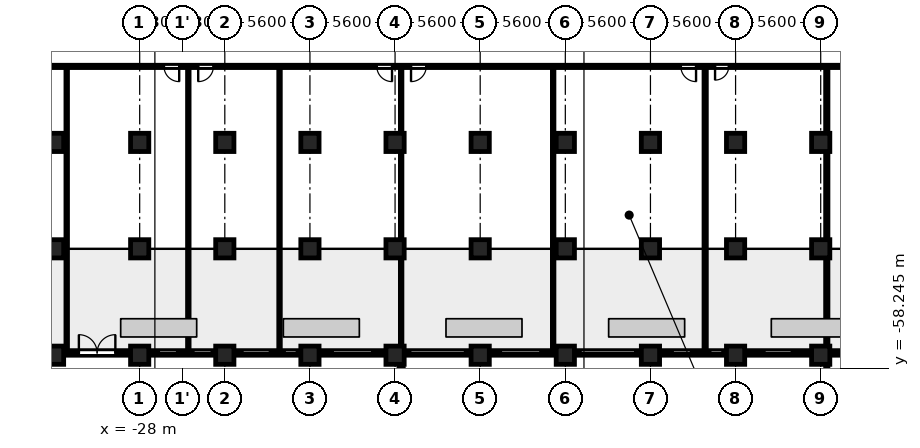
"""IFC4 building model, lengths in metres.
Left out: names, types, materials, properties, quantities, classifications, styles, units other than length and angle.
Written with IfcOpenShell. Run it as: python <this file> out.ifc"""

import sys

from ifc_helpers import new_model, si_unit, direction, frame, frame_2d, origin, origin_2d, place, context, subcontext, project, spatial, rectangle, circle, extrude, element, fill, save


model = new_model("IFC4")
c1 = context("Model", 3, precision=1e-05, world=origin(), true_north=direction((0.0, 1.0)))
c2 = subcontext(c1, "Body", "Model", "MODEL_VIEW")
j1 = project(units=[si_unit("LENGTHUNIT", "METRE"), si_unit("PLANEANGLEUNIT", "RADIAN")], contexts=[c1])
p1 = place(None, origin())
s1 = spatial("IfcSite", under=j1, at=p1, CompositionType="ELEMENT")
p2 = place(p1, origin())
s2 = spatial("IfcBuilding", under=s1, at=p2, CompositionType="ELEMENT")
p3 = place(p2, frame((0.0, 0.0, 6.5)))
s3 = spatial("IfcBuildingStorey", under=s2, at=p3, CompositionType="ELEMENT", Elevation=6.5)
for number, where, z_axis, x_axis in (
    (1, (-33.6, -43.4, 0.0), (0.0, 0.0, 1.0), (1.0, 0.0, 0.0)),
    (2, (-28.0, -43.4, 0.0), (0.0, 0.0, 1.0), (1.0, 0.0, 0.0)),
    (3, (-22.4, -43.4, 0.0), (0.0, 0.0, 1.0), (1.0, 0.0, 0.0)),
    (4, (-16.8, -43.4, 0.0), (0.0, 0.0, 1.0), (1.0, 0.0, 0.0)),
    (5, (-11.2, -43.4, 0.0), (0.0, 0.0, 1.0), (1.0, 0.0, 0.0)),
    (6, (-5.6, -43.4, 0.0), (0.0, 0.0, 1.0), (1.0, 0.0, 0.0)),
    (7, (0.0, -43.4, 0.0), (0.0, 0.0, 1.0), (1.0, 0.0, 0.0)),
    (8, (5.6, -43.4, 0.0), (0.0, 0.0, 1.0), (1.0, 0.0, 0.0)),
    (9, (11.2, -43.4, 0.0), (0.0, 0.0, 1.0), (1.0, 0.0, 0.0)),
    (10, (16.8, -43.4, 0.0), (0.0, 0.0, 1.0), (1.0, 0.0, 0.0)),
    (11, (-33.6, -50.4, 0.0), (0.0, 0.0, 1.0), (1.0, 0.0, 0.0)),
    (12, (-28.0, -50.4, 0.0), (0.0, 0.0, 1.0), (1.0, 0.0, 0.0)),
    (13, (-22.4, -50.4, 0.0), (0.0, 0.0, 1.0), (1.0, 0.0, 0.0)),
    (14, (-16.8, -50.4, 0.0), (0.0, 0.0, 1.0), (1.0, 0.0, 0.0)),
    (15, (-11.2, -50.4, 0.0), (0.0, 0.0, 1.0), (1.0, 0.0, 0.0)),
    (16, (-5.6, -50.4, 0.0), (0.0, 0.0, 1.0), (1.0, 0.0, 0.0)),
    (17, (0.0, -50.4, 0.0), (0.0, 0.0, 1.0), (1.0, 0.0, 0.0)),
    (18, (5.6, -50.4, 0.0), (0.0, 0.0, 1.0), (1.0, 0.0, 0.0)),
    (19, (11.2, -50.4, 0.0), (0.0, 0.0, 1.0), (1.0, 0.0, 0.0)),
    (20, (16.8, -50.4, 0.0), (0.0, 0.0, 1.0), (1.0, 0.0, 0.0)),
    (21, (-33.6, -57.4, 0.0), (0.0, 0.0, 1.0), (1.0, 0.0, 0.0)),
    (22, (-28.0, -57.4, 0.0), (0.0, 0.0, 1.0), (1.0, 0.0, 0.0)),
    (23, (-22.4, -57.4, 0.0), (0.0, 0.0, 1.0), (1.0, 0.0, 0.0)),
    (24, (-16.8, -57.4, 0.0), (0.0, 0.0, 1.0), (1.0, 0.0, 0.0)),
    (25, (-11.2, -57.4, 0.0), (0.0, 0.0, 1.0), (1.0, 0.0, 0.0)),
    (26, (-5.6, -57.4, 0.0), (0.0, 0.0, 1.0), (1.0, 0.0, 0.0)),
    (27, (0.0, -57.4, 0.0), (0.0, 0.0, 1.0), (1.0, 0.0, 0.0)),
    (28, (5.6, -57.4, 0.0), (0.0, 0.0, 1.0), (1.0, 0.0, 0.0)),
    (29, (11.2, -57.4, 0.0), (0.0, 0.0, 1.0), (1.0, 0.0, 0.0)),
    (30, (16.8, -57.4, 0.0), (0.0, 0.0, 1.0), (1.0, 0.0, 0.0)),
):
    element("IfcColumn", number, at=place(p3, frame(where, z_axis=z_axis, x_axis=x_axis)), inside=s3, PredefinedType="COLUMN", context=c2, shape_type="SweptSolid", body=[
        extrude(circle(Radius=0.6, at=origin_2d()), origin(), (0.0, 0.0, 1.0), 4.8),
    ])
p4 = place(p3, frame((-33.0, -57.25, 0.0), z_axis=(0.0, 0.0, 1.0), x_axis=(1.0, 0.0, 0.0)))
e31 = element("IfcWall", 31, at=p4, inside=s3, PredefinedType="SOLIDWALL", context=c2, shape_type="SweptSolid", body=[
    extrude(rectangle(XDim=4.4, YDim=0.3, at=frame_2d((2.2, 0.0))), origin(), (0.0, 0.0, 1.0), 3.65),
])
p5 = place(p4, frame((1.0, 0.0, 0.0)))
e32 = element("IfcOpeningElement", 32, at=p5, cuts=e31, PredefinedType="OPENING", context=c2, shape_type="SweptSolid", body=[
    extrude(rectangle(XDim=2.4, YDim=2.3, at=frame_2d((1.2, 1.15))), frame((0.0, 0.16, 0.0), z_axis=(0.0, -1.0, 0.0), x_axis=(1.0, 0.0, 0.0)), (0.0, 0.0, 1.0), 0.32),
])
p6 = place(p3, frame((-27.4, -57.25, 0.0), z_axis=(0.0, 0.0, 1.0), x_axis=(1.0, 0.0, 0.0)))
e33 = element("IfcWall", 33, at=p6, inside=s3, PredefinedType="SOLIDWALL", context=c2, shape_type="SweptSolid", body=[
    extrude(rectangle(XDim=4.4, YDim=0.3, at=frame_2d((2.2, 0.0))), origin(), (0.0, 0.0, 1.0), 3.65),
])
p7 = place(p6, frame((0.663, 0.0, 0.6)))
e34 = element("IfcOpeningElement", 34, at=p7, cuts=e33, PredefinedType="OPENING", context=c2, shape_type="SweptSolid", body=[
    extrude(rectangle(XDim=1.2, YDim=1.55, at=frame_2d((0.6, 0.775))), frame((0.0, 0.16, 0.0), z_axis=(0.0, -1.0, 0.0), x_axis=(1.0, 0.0, 0.0)), (0.0, 0.0, 1.0), 0.32),
])
p8 = place(p6, frame((2.938, 0.0, 0.6)))
e35 = element("IfcOpeningElement", 35, at=p8, cuts=e33, PredefinedType="OPENING", context=c2, shape_type="SweptSolid", body=[
    extrude(rectangle(XDim=1.2, YDim=1.55, at=frame_2d((0.6, 0.775))), frame((0.0, 0.16, 0.0), z_axis=(0.0, -1.0, 0.0), x_axis=(1.0, 0.0, 0.0)), (0.0, 0.0, 1.0), 0.32),
])
p9 = place(p3, frame((-21.8, -57.25, 0.0), z_axis=(0.0, 0.0, 1.0), x_axis=(1.0, 0.0, 0.0)))
e36 = element("IfcWall", 36, at=p9, inside=s3, PredefinedType="SOLIDWALL", context=c2, shape_type="SweptSolid", body=[
    extrude(rectangle(XDim=4.4, YDim=0.3, at=frame_2d((2.2, 0.0))), origin(), (0.0, 0.0, 1.0), 3.65),
])
p10 = place(p9, frame((0.562, 0.0, 0.9)))
e37 = element("IfcOpeningElement", 37, at=p10, cuts=e36, PredefinedType="OPENING", context=c2, shape_type="SweptSolid", body=[
    extrude(rectangle(XDim=1.8, YDim=1.25, at=frame_2d((0.9, 0.625))), frame((0.0, 0.16, 0.0), z_axis=(0.0, -1.0, 0.0), x_axis=(1.0, 0.0, 0.0)), (0.0, 0.0, 1.0), 0.32),
])
p11 = place(p9, frame((3.337, 0.0, 0.6)))
e38 = element("IfcOpeningElement", 38, at=p11, cuts=e36, PredefinedType="OPENING", context=c2, shape_type="SweptSolid", body=[
    extrude(rectangle(XDim=0.8, YDim=1.55, at=frame_2d((0.4, 0.775))), frame((0.0, 0.16, 0.0), z_axis=(0.0, -1.0, 0.0), x_axis=(1.0, 0.0, 0.0)), (0.0, 0.0, 1.0), 0.32),
])
p12 = place(p3, frame((-16.2, -57.25, 0.0), z_axis=(0.0, 0.0, 1.0), x_axis=(1.0, 0.0, 0.0)))
e39 = element("IfcWall", 39, at=p12, inside=s3, PredefinedType="SOLIDWALL", context=c2, shape_type="SweptSolid", body=[
    extrude(rectangle(XDim=4.4, YDim=0.3, at=frame_2d((2.2, 0.0))), origin(), (0.0, 0.0, 1.0), 3.65),
])
p13 = place(p12, frame((0.9, 0.0, 0.9)))
e40 = element("IfcOpeningElement", 40, at=p13, cuts=e39, PredefinedType="OPENING", context=c2, shape_type="SweptSolid", body=[
    extrude(rectangle(XDim=2.6, YDim=1.25, at=frame_2d((1.3, 0.625))), frame((0.0, 0.16, 0.0), z_axis=(0.0, -1.0, 0.0), x_axis=(1.0, 0.0, 0.0)), (0.0, 0.0, 1.0), 0.32),
])
p14 = place(p3, frame((-10.6, -57.25, 0.0), z_axis=(0.0, 0.0, 1.0), x_axis=(1.0, 0.0, 0.0)))
e41 = element("IfcWall", 41, at=p14, inside=s3, PredefinedType="SOLIDWALL", context=c2, shape_type="SweptSolid", body=[
    extrude(rectangle(XDim=4.4, YDim=0.3, at=frame_2d((2.2, 0.0))), origin(), (0.0, 0.0, 1.0), 3.65),
])
p15 = place(p14, frame((0.4, 0.0, 1.2)))
e42 = element("IfcOpeningElement", 42, at=p15, cuts=e41, PredefinedType="OPENING", context=c2, shape_type="SweptSolid", body=[
    extrude(rectangle(XDim=3.6, YDim=0.95, at=frame_2d((1.8, 0.475))), frame((0.0, 0.16, 0.0), z_axis=(0.0, -1.0, 0.0), x_axis=(1.0, 0.0, 0.0)), (0.0, 0.0, 1.0), 0.32),
])
p16 = place(p3, frame((-5.0, -57.25, 0.0), z_axis=(0.0, 0.0, 1.0), x_axis=(1.0, 0.0, 0.0)))
e43 = element("IfcWall", 43, at=p16, inside=s3, PredefinedType="SOLIDWALL", context=c2, shape_type="SweptSolid", body=[
    extrude(rectangle(XDim=4.4, YDim=0.3, at=frame_2d((2.2, 0.0))), origin(), (0.0, 0.0, 1.0), 3.65),
])
p17 = place(p16, frame((0.762, 0.0, 0.9)))
e44 = element("IfcOpeningElement", 44, at=p17, cuts=e43, PredefinedType="OPENING", context=c2, shape_type="SweptSolid", body=[
    extrude(rectangle(XDim=2.6, YDim=1.25, at=frame_2d((1.3, 0.625))), frame((0.0, 0.16, 0.0), z_axis=(0.0, -1.0, 0.0), x_axis=(1.0, 0.0, 0.0)), (0.0, 0.0, 1.0), 0.32),
])
p18 = place(p3, frame((0.6, -57.25, 0.0), z_axis=(0.0, 0.0, 1.0), x_axis=(1.0, 0.0, 0.0)))
e45 = element("IfcWall", 45, at=p18, inside=s3, PredefinedType="SOLIDWALL", context=c2, shape_type="SweptSolid", body=[
    extrude(rectangle(XDim=4.4, YDim=0.3, at=frame_2d((2.2, 0.0))), origin(), (0.0, 0.0, 1.0), 3.65),
])
p19 = place(p18, frame((0.4, 0.0, 1.2)))
e46 = element("IfcOpeningElement", 46, at=p19, cuts=e45, PredefinedType="OPENING", context=c2, shape_type="SweptSolid", body=[
    extrude(rectangle(XDim=3.6, YDim=0.95, at=frame_2d((1.8, 0.475))), frame((0.0, 0.16, 0.0), z_axis=(0.0, -1.0, 0.0), x_axis=(1.0, 0.0, 0.0)), (0.0, 0.0, 1.0), 0.32),
])
p20 = place(p3, frame((6.2, -57.25, 0.0), z_axis=(0.0, 0.0, 1.0), x_axis=(1.0, 0.0, 0.0)))
e47 = element("IfcWall", 47, at=p20, inside=s3, PredefinedType="SOLIDWALL", context=c2, shape_type="SweptSolid", body=[
    extrude(rectangle(XDim=4.4, YDim=0.3, at=frame_2d((2.2, 0.0))), origin(), (0.0, 0.0, 1.0), 3.65),
])
p21 = place(p20, frame((0.863, 0.0, 0.6)))
e48 = element("IfcOpeningElement", 48, at=p21, cuts=e47, PredefinedType="OPENING", context=c2, shape_type="SweptSolid", body=[
    extrude(rectangle(XDim=1.2, YDim=1.55, at=frame_2d((0.6, 0.775))), frame((0.0, 0.16, 0.0), z_axis=(0.0, -1.0, 0.0), x_axis=(1.0, 0.0, 0.0)), (0.0, 0.0, 1.0), 0.32),
])
p22 = place(p20, frame((3.337, 0.0, 0.6)))
e49 = element("IfcOpeningElement", 49, at=p22, cuts=e47, PredefinedType="OPENING", context=c2, shape_type="SweptSolid", body=[
    extrude(rectangle(XDim=0.8, YDim=1.55, at=frame_2d((0.4, 0.775))), frame((0.0, 0.16, 0.0), z_axis=(0.0, -1.0, 0.0), x_axis=(1.0, 0.0, 0.0)), (0.0, 0.0, 1.0), 0.32),
])
p23 = place(p3, frame((11.8, -57.25, 0.0), z_axis=(0.0, 0.0, 1.0), x_axis=(1.0, 0.0, 0.0)))
e50 = element("IfcWall", 50, at=p23, inside=s3, PredefinedType="SOLIDWALL", context=c2, shape_type="SweptSolid", body=[
    extrude(rectangle(XDim=4.4, YDim=0.3, at=frame_2d((2.2, 0.0))), origin(), (0.0, 0.0, 1.0), 3.65),
])
p24 = place(p23, frame((1.3, 0.0, 0.9)))
e51 = element("IfcOpeningElement", 51, at=p24, cuts=e50, PredefinedType="OPENING", context=c2, shape_type="SweptSolid", body=[
    extrude(rectangle(XDim=1.8, YDim=1.25, at=frame_2d((0.9, 0.625))), frame((0.0, 0.16, 0.0), z_axis=(0.0, -1.0, 0.0), x_axis=(1.0, 0.0, 0.0)), (0.0, 0.0, 1.0), 0.32),
])
p25 = place(p3, frame((17.4, -57.25, 0.0), z_axis=(0.0, 0.0, 1.0), x_axis=(1.0, 0.0, 0.0)))
e52 = element("IfcWall", 52, at=p25, inside=s3, PredefinedType="SOLIDWALL", context=c2, shape_type="SweptSolid", body=[
    extrude(rectangle(XDim=4.4, YDim=0.3, at=frame_2d((2.2, 0.0))), origin(), (0.0, 0.0, 1.0), 3.65),
])
p26 = place(p3, frame((-44.48, -38.4, 0.0), z_axis=(0.0, 0.0, 1.0), x_axis=(1.0, 0.0, 0.0)))
e53 = element("IfcWall", 53, at=p26, inside=s3, PredefinedType="PARTITIONING", context=c2, shape_type="SweptSolid", body=[
    extrude(rectangle(XDim=88.96, YDim=0.15, at=frame_2d((44.48, 0.0))), origin(), (0.0, 0.0, 1.0), 4.45),
])
p27 = place(p26, frame((0.42, 0.0, 0.0)))
e54 = element("IfcOpeningElement", 54, at=p27, cuts=e53, PredefinedType="OPENING", context=c2, shape_type="SweptSolid", body=[
    extrude(rectangle(XDim=1.0, YDim=2.1, at=frame_2d((0.5, 1.05))), frame((0.0, 0.085, 0.0), z_axis=(0.0, -1.0, 0.0), x_axis=(1.0, 0.0, 0.0)), (0.0, 0.0, 1.0), 0.17),
])
p28 = place(p26, frame((18.08, 0.0, 0.0)))
e55 = element("IfcOpeningElement", 55, at=p28, cuts=e53, PredefinedType="OPENING", context=c2, shape_type="SweptSolid", body=[
    extrude(rectangle(XDim=1.0, YDim=2.1, at=frame_2d((0.5, 1.05))), frame((0.0, 0.085, 0.0), z_axis=(0.0, -1.0, 0.0), x_axis=(1.0, 0.0, 0.0)), (0.0, 0.0, 1.0), 0.17),
])
p29 = place(p26, frame((20.33, 0.0, 0.0)))
e56 = element("IfcOpeningElement", 56, at=p29, cuts=e53, PredefinedType="OPENING", context=c2, shape_type="SweptSolid", body=[
    extrude(rectangle(XDim=1.0, YDim=2.1, at=frame_2d((0.5, 1.05))), frame((0.0, 0.085, 0.0), z_axis=(0.0, -1.0, 0.0), x_axis=(1.0, 0.0, 0.0)), (0.0, 0.0, 1.0), 0.17),
])
p30 = place(p26, frame((32.08, 0.0, 0.0)))
e57 = element("IfcOpeningElement", 57, at=p30, cuts=e53, PredefinedType="OPENING", context=c2, shape_type="SweptSolid", body=[
    extrude(rectangle(XDim=1.0, YDim=2.1, at=frame_2d((0.5, 1.05))), frame((0.0, 0.085, 0.0), z_axis=(0.0, -1.0, 0.0), x_axis=(1.0, 0.0, 0.0)), (0.0, 0.0, 1.0), 0.17),
])
p31 = place(p26, frame((34.33, 0.0, 0.0)))
e58 = element("IfcOpeningElement", 58, at=p31, cuts=e53, PredefinedType="OPENING", context=c2, shape_type="SweptSolid", body=[
    extrude(rectangle(XDim=1.0, YDim=2.1, at=frame_2d((0.5, 1.05))), frame((0.0, 0.085, 0.0), z_axis=(0.0, -1.0, 0.0), x_axis=(1.0, 0.0, 0.0)), (0.0, 0.0, 1.0), 0.17),
])
p32 = place(p26, frame((52.08, 0.0, 0.0)))
e59 = element("IfcOpeningElement", 59, at=p32, cuts=e53, PredefinedType="OPENING", context=c2, shape_type="SweptSolid", body=[
    extrude(rectangle(XDim=1.0, YDim=2.1, at=frame_2d((0.5, 1.05))), frame((0.0, 0.085, 0.0), z_axis=(0.0, -1.0, 0.0), x_axis=(1.0, 0.0, 0.0)), (0.0, 0.0, 1.0), 0.17),
])
p33 = place(p26, frame((54.33, 0.0, 0.0)))
e60 = element("IfcOpeningElement", 60, at=p33, cuts=e53, PredefinedType="OPENING", context=c2, shape_type="SweptSolid", body=[
    extrude(rectangle(XDim=0.9, YDim=2.1, at=frame_2d((0.45, 1.05))), frame((0.0, 0.085, 0.0), z_axis=(0.0, -1.0, 0.0), x_axis=(1.0, 0.0, 0.0)), (0.0, 0.0, 1.0), 0.17),
])
p34 = place(p26, frame((87.58, 0.0, 0.0)))
e61 = element("IfcOpeningElement", 61, at=p34, cuts=e53, PredefinedType="OPENING", context=c2, shape_type="SweptSolid", body=[
    extrude(rectangle(XDim=1.0, YDim=2.1, at=frame_2d((0.5, 1.05))), frame((0.0, 0.085, 0.0), z_axis=(0.0, -1.0, 0.0), x_axis=(1.0, 0.0, 0.0)), (0.0, 0.0, 1.0), 0.17),
])
for number, where, z_axis, x_axis in (
    (62, (-32.8, -57.08, 0.0), (0.0, 0.0, 1.0), (0.0, 1.0, 0.0)),
    (63, (-24.8, -57.08, 0.0), (0.0, 0.0, 1.0), (0.0, 1.0, 0.0)),
    (64, (-18.8, -57.08, 0.0), (0.0, 0.0, 1.0), (0.0, 1.0, 0.0)),
):
    element("IfcWall", number, at=place(p3, frame(where, z_axis=z_axis, x_axis=x_axis)), inside=s3, PredefinedType="PARTITIONING", context=c2, shape_type="SweptSolid", body=[
        extrude(rectangle(XDim=18.605, YDim=0.1, at=frame_2d((9.302, 0.0))), origin(), (0.0, 0.0, 1.0), 4.45),
    ])
p35 = place(p3, frame((-10.8, -58.23, 0.0), z_axis=(0.0, 0.0, 1.0), x_axis=(0.0, 1.0, 0.0)))
e65 = element("IfcWall", 65, at=p35, inside=s3, PredefinedType="PARTITIONING", context=c2, shape_type="SweptSolid", body=[
    extrude(rectangle(XDim=19.755, YDim=0.1, at=frame_2d((9.877, 0.0))), origin(), (0.0, 0.0, 1.0), 4.45),
])
p36 = place(p3, frame((-0.8, -57.08, 0.0), z_axis=(0.0, 0.0, 1.0), x_axis=(0.0, 1.0, 0.0)))
e66 = element("IfcWall", 66, at=p36, inside=s3, PredefinedType="PARTITIONING", context=c2, shape_type="SweptSolid", body=[
    extrude(rectangle(XDim=18.605, YDim=0.1, at=frame_2d((9.302, 0.0))), origin(), (0.0, 0.0, 1.0), 4.45),
])
p37 = place(p3, frame((9.2, -57.08, 0.0), z_axis=(0.0, 0.0, 1.0), x_axis=(0.0, 1.0, 0.0)))
e67 = element("IfcWall", 67, at=p37, inside=s3, PredefinedType="PARTITIONING", context=c2, shape_type="SweptSolid", body=[
    extrude(rectangle(XDim=18.605, YDim=0.15, at=frame_2d((9.302, 0.0))), origin(), (0.0, 0.0, 1.0), 4.45),
])
p38 = place(p3, frame((17.2, -58.23, 0.0), z_axis=(0.0, 0.0, 1.0), x_axis=(0.0, 1.0, 0.0)))
e68 = element("IfcWall", 68, at=p38, inside=s3, PredefinedType="PARTITIONING", context=c2, shape_type="SweptSolid", body=[
    extrude(rectangle(XDim=19.755, YDim=0.15, at=frame_2d((9.877, 0.0))), origin(), (0.0, 0.0, 1.0), 4.45),
])
p39 = place(p5, origin())
e69 = element("IfcDoor", 69, at=p39, inside=s3, OperationType="SINGLE_SWING_LEFT", PredefinedType="DOOR", context=c2, shape_type="SweptSolid", body=[
    extrude(rectangle(XDim=2.4, YDim=2.3, at=frame_2d((1.2, 1.15))), frame((0.0, 0.025, 0.0), z_axis=(0.0, -1.0, 0.0), x_axis=(1.0, 0.0, 0.0)), (0.0, 0.0, 1.0), 0.05),
])
fill(e32, e69)
p40 = place(p28, origin())
e70 = element("IfcDoor", 70, at=p40, inside=s3, OperationType="SINGLE_SWING_RIGHT", PredefinedType="DOOR", context=c2, shape_type="SweptSolid", body=[
    extrude(rectangle(XDim=1.0, YDim=2.1, at=frame_2d((0.5, 1.05))), frame((0.0, 0.025, 0.0), z_axis=(0.0, -1.0, 0.0), x_axis=(1.0, 0.0, 0.0)), (0.0, 0.0, 1.0), 0.05),
])
fill(e55, e70)
p41 = place(p29, origin())
e71 = element("IfcDoor", 71, at=p41, inside=s3, OperationType="SINGLE_SWING_LEFT", PredefinedType="DOOR", context=c2, shape_type="SweptSolid", body=[
    extrude(rectangle(XDim=1.0, YDim=2.1, at=frame_2d((0.5, 1.05))), frame((0.0, 0.025, 0.0), z_axis=(0.0, -1.0, 0.0), x_axis=(1.0, 0.0, 0.0)), (0.0, 0.0, 1.0), 0.05),
])
fill(e56, e71)
p42 = place(p30, origin())
e72 = element("IfcDoor", 72, at=p42, inside=s3, OperationType="SINGLE_SWING_RIGHT", PredefinedType="DOOR", context=c2, shape_type="SweptSolid", body=[
    extrude(rectangle(XDim=1.0, YDim=2.1, at=frame_2d((0.5, 1.05))), frame((0.0, 0.025, 0.0), z_axis=(0.0, -1.0, 0.0), x_axis=(1.0, 0.0, 0.0)), (0.0, 0.0, 1.0), 0.05),
])
fill(e57, e72)
p43 = place(p31, origin())
e73 = element("IfcDoor", 73, at=p43, inside=s3, OperationType="SINGLE_SWING_LEFT", PredefinedType="DOOR", context=c2, shape_type="SweptSolid", body=[
    extrude(rectangle(XDim=1.0, YDim=2.1, at=frame_2d((0.5, 1.05))), frame((0.0, 0.025, 0.0), z_axis=(0.0, -1.0, 0.0), x_axis=(1.0, 0.0, 0.0)), (0.0, 0.0, 1.0), 0.05),
])
fill(e58, e73)
p44 = place(p32, origin())
e74 = element("IfcDoor", 74, at=p44, inside=s3, OperationType="SINGLE_SWING_RIGHT", PredefinedType="DOOR", context=c2, shape_type="SweptSolid", body=[
    extrude(rectangle(XDim=1.0, YDim=2.1, at=frame_2d((0.5, 1.05))), frame((0.0, 0.025, 0.0), z_axis=(0.0, -1.0, 0.0), x_axis=(1.0, 0.0, 0.0)), (0.0, 0.0, 1.0), 0.05),
])
fill(e59, e74)
p45 = place(p33, origin())
e75 = element("IfcDoor", 75, at=p45, inside=s3, OperationType="SINGLE_SWING_LEFT", PredefinedType="DOOR", context=c2, shape_type="SweptSolid", body=[
    extrude(rectangle(XDim=0.9, YDim=2.1, at=frame_2d((0.45, 1.05))), frame((0.0, 0.025, 0.0), z_axis=(0.0, -1.0, 0.0), x_axis=(1.0, 0.0, 0.0)), (0.0, 0.0, 1.0), 0.05),
])
fill(e60, e75)
p46 = place(p7, origin())
e76 = element("IfcWindow", 76, at=p46, inside=s3, PartitioningType="SINGLE_PANEL", PredefinedType="WINDOW", context=c2, shape_type="SweptSolid", body=[
    extrude(rectangle(XDim=1.2, YDim=1.55, at=frame_2d((0.6, 0.775))), frame((0.0, 0.03, 0.0), z_axis=(0.0, -1.0, 0.0), x_axis=(1.0, 0.0, 0.0)), (0.0, 0.0, 1.0), 0.06),
])
fill(e34, e76)
p47 = place(p8, origin())
e77 = element("IfcWindow", 77, at=p47, inside=s3, PartitioningType="SINGLE_PANEL", PredefinedType="WINDOW", context=c2, shape_type="SweptSolid", body=[
    extrude(rectangle(XDim=1.2, YDim=1.55, at=frame_2d((0.6, 0.775))), frame((0.0, 0.03, 0.0), z_axis=(0.0, -1.0, 0.0), x_axis=(1.0, 0.0, 0.0)), (0.0, 0.0, 1.0), 0.06),
])
fill(e35, e77)
p48 = place(p10, origin())
e78 = element("IfcWindow", 78, at=p48, inside=s3, PartitioningType="SINGLE_PANEL", PredefinedType="WINDOW", context=c2, shape_type="SweptSolid", body=[
    extrude(rectangle(XDim=1.8, YDim=1.25, at=frame_2d((0.9, 0.625))), frame((0.0, 0.03, 0.0), z_axis=(0.0, -1.0, 0.0), x_axis=(1.0, 0.0, 0.0)), (0.0, 0.0, 1.0), 0.06),
])
fill(e37, e78)
p49 = place(p11, origin())
e79 = element("IfcWindow", 79, at=p49, inside=s3, PartitioningType="SINGLE_PANEL", PredefinedType="WINDOW", context=c2, shape_type="SweptSolid", body=[
    extrude(rectangle(XDim=0.8, YDim=1.55, at=frame_2d((0.4, 0.775))), frame((0.0, 0.03, 0.0), z_axis=(0.0, -1.0, 0.0), x_axis=(1.0, 0.0, 0.0)), (0.0, 0.0, 1.0), 0.06),
])
fill(e38, e79)
p50 = place(p13, origin())
e80 = element("IfcWindow", 80, at=p50, inside=s3, PartitioningType="SINGLE_PANEL", PredefinedType="WINDOW", context=c2, shape_type="SweptSolid", body=[
    extrude(rectangle(XDim=2.6, YDim=1.25, at=frame_2d((1.3, 0.625))), frame((0.0, 0.03, 0.0), z_axis=(0.0, -1.0, 0.0), x_axis=(1.0, 0.0, 0.0)), (0.0, 0.0, 1.0), 0.06),
])
fill(e40, e80)
p51 = place(p15, origin())
e81 = element("IfcWindow", 81, at=p51, inside=s3, PartitioningType="SINGLE_PANEL", PredefinedType="WINDOW", context=c2, shape_type="SweptSolid", body=[
    extrude(rectangle(XDim=3.6, YDim=0.95, at=frame_2d((1.8, 0.475))), frame((0.0, 0.03, 0.0), z_axis=(0.0, -1.0, 0.0), x_axis=(1.0, 0.0, 0.0)), (0.0, 0.0, 1.0), 0.06),
])
fill(e42, e81)
p52 = place(p17, origin())
e82 = element("IfcWindow", 82, at=p52, inside=s3, PartitioningType="SINGLE_PANEL", PredefinedType="WINDOW", context=c2, shape_type="SweptSolid", body=[
    extrude(rectangle(XDim=2.6, YDim=1.25, at=frame_2d((1.3, 0.625))), frame((0.0, 0.03, 0.0), z_axis=(0.0, -1.0, 0.0), x_axis=(1.0, 0.0, 0.0)), (0.0, 0.0, 1.0), 0.06),
])
fill(e44, e82)
p53 = place(p19, origin())
e83 = element("IfcWindow", 83, at=p53, inside=s3, PartitioningType="SINGLE_PANEL", PredefinedType="WINDOW", context=c2, shape_type="SweptSolid", body=[
    extrude(rectangle(XDim=3.6, YDim=0.95, at=frame_2d((1.8, 0.475))), frame((0.0, 0.03, 0.0), z_axis=(0.0, -1.0, 0.0), x_axis=(1.0, 0.0, 0.0)), (0.0, 0.0, 1.0), 0.06),
])
fill(e46, e83)
p54 = place(p21, origin())
e84 = element("IfcWindow", 84, at=p54, inside=s3, PartitioningType="SINGLE_PANEL", PredefinedType="WINDOW", context=c2, shape_type="SweptSolid", body=[
    extrude(rectangle(XDim=1.2, YDim=1.55, at=frame_2d((0.6, 0.775))), frame((0.0, 0.03, 0.0), z_axis=(0.0, -1.0, 0.0), x_axis=(1.0, 0.0, 0.0)), (0.0, 0.0, 1.0), 0.06),
])
fill(e48, e84)
p55 = place(p22, origin())
e85 = element("IfcWindow", 85, at=p55, inside=s3, PartitioningType="SINGLE_PANEL", PredefinedType="WINDOW", context=c2, shape_type="SweptSolid", body=[
    extrude(rectangle(XDim=0.8, YDim=1.55, at=frame_2d((0.4, 0.775))), frame((0.0, 0.03, 0.0), z_axis=(0.0, -1.0, 0.0), x_axis=(1.0, 0.0, 0.0)), (0.0, 0.0, 1.0), 0.06),
])
fill(e49, e85)
p56 = place(p24, origin())
e86 = element("IfcWindow", 86, at=p56, inside=s3, PartitioningType="SINGLE_PANEL", PredefinedType="WINDOW", context=c2, shape_type="SweptSolid", body=[
    extrude(rectangle(XDim=1.8, YDim=1.25, at=frame_2d((0.9, 0.625))), frame((0.0, 0.03, 0.0), z_axis=(0.0, -1.0, 0.0), x_axis=(1.0, 0.0, 0.0)), (0.0, 0.0, 1.0), 0.06),
])
fill(e51, e86)
save(model, sys.argv[1])
